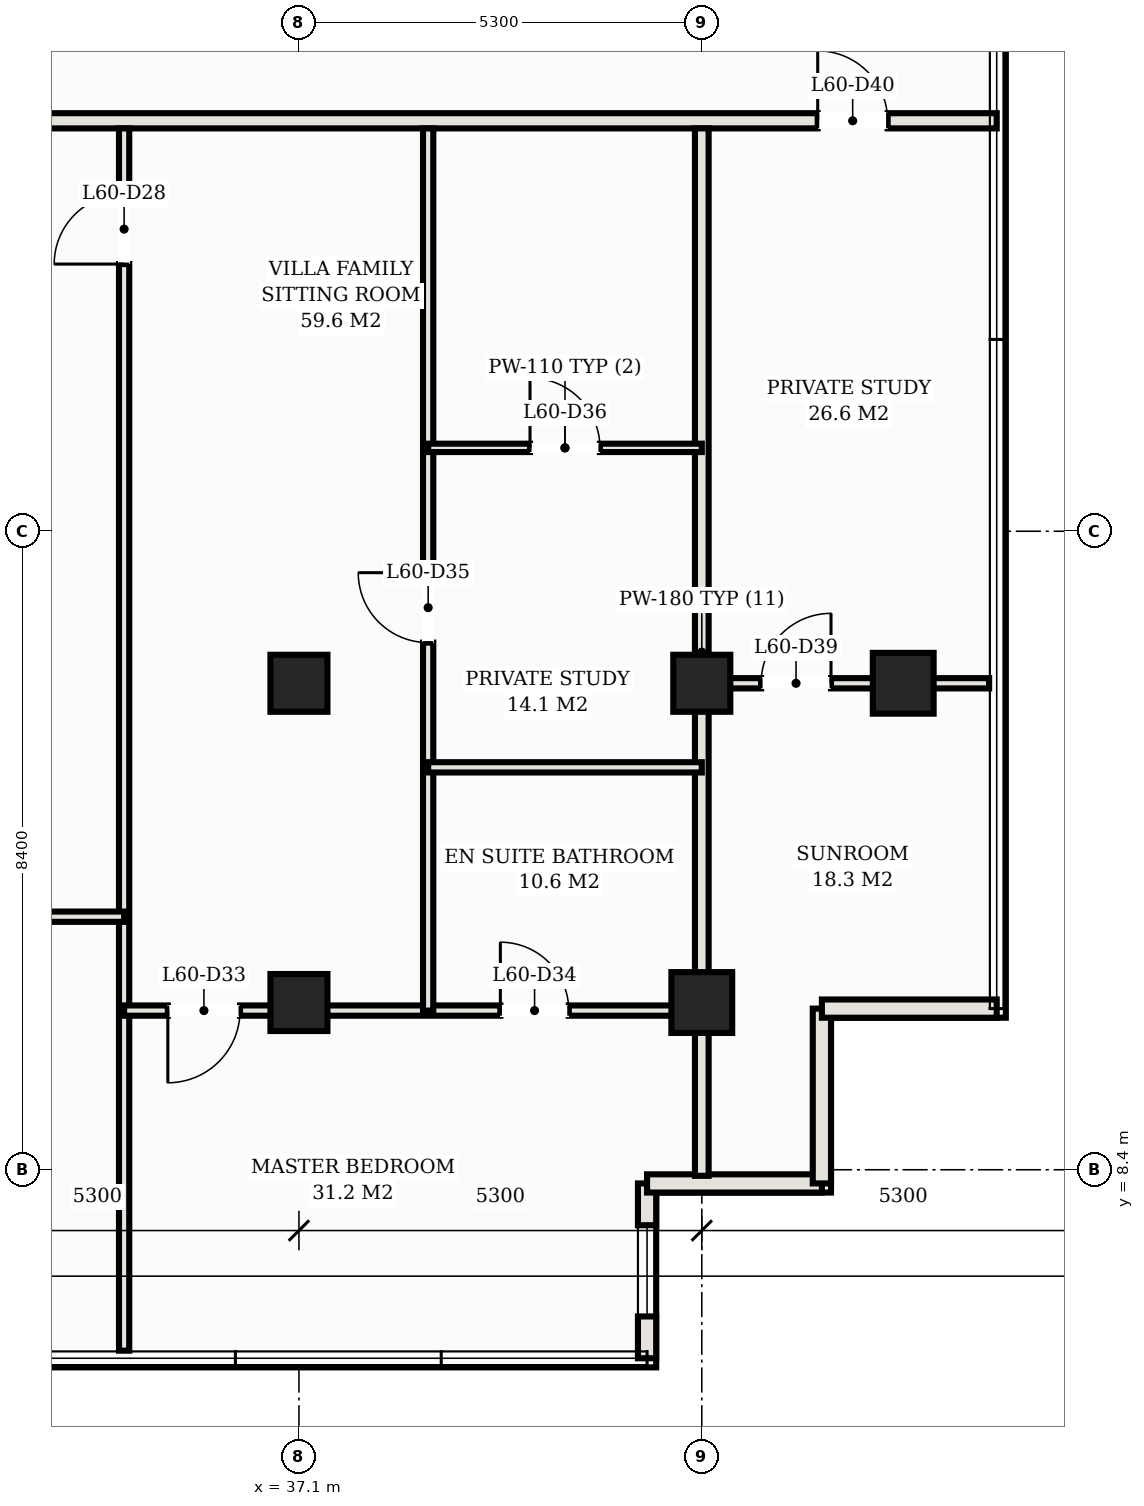
"""IFC4 building model, lengths in metres.
Left out: names, types, materials, properties, quantities, classifications, styles, units other than length and angle.
Written with IfcOpenShell. Run it as: python <this file> out.ifc"""

import sys

from ifc_helpers import new_model, si_unit, direction, frame, frame_2d, origin, origin_2d, place, context, subcontext, project, spatial, rectangle, hollow_rectangle, extrude, element, fill, save


model = new_model("IFC4")
c1 = context("Model", 3, precision=1e-05, world=origin(), true_north=direction((0.0, 1.0)))
c2 = subcontext(c1, "Body", "Model", "MODEL_VIEW")
j1 = project(units=[si_unit("LENGTHUNIT", "METRE"), si_unit("PLANEANGLEUNIT", "RADIAN")], contexts=[c1])
p1 = place(None, origin())
s1 = spatial("IfcSite", under=j1, at=p1, CompositionType="ELEMENT")
p2 = place(p1, origin())
s2 = spatial("IfcBuilding", under=s1, at=p2, CompositionType="ELEMENT")
p3 = place(p2, frame((0.0, 0.0, 219.8)))
s3 = spatial("IfcBuildingStorey", under=s2, at=p3, CompositionType="ELEMENT", Elevation=219.8)
for number, where, z_axis, x_axis in (
    (1, (37.1, 14.8, 0.0), (0.0, 0.0, 1.0), (1.0, 0.0, 0.0)),
    (2, (37.1, 10.6, 0.0), (0.0, 0.0, 1.0), (1.0, 0.0, 0.0)),
    (3, (42.4, 14.8, 0.0), (0.0, 0.0, 1.0), (1.0, 0.0, 0.0)),
):
    element("IfcColumn", number, at=place(p3, frame(where, z_axis=z_axis, x_axis=x_axis)), inside=s3, PredefinedType="COLUMN", context=c2, shape_type="SweptSolid", body=[
        extrude(hollow_rectangle(XDim=0.75, YDim=0.75, WallThickness=0.025, at=origin_2d()), origin(), (0.0, 0.0, 1.0), 3.3),
    ])
for number, where, z_axis, x_axis in (
    (4, (42.4, 10.6, 0.0), (0.0, 0.0, 1.0), (1.0, 0.0, 0.0)),
    (5, (45.05, 14.8, 0.0), (0.0, 0.0, 1.0), (1.0, 0.0, 0.0)),
):
    element("IfcColumn", number, at=place(p3, frame(where, z_axis=z_axis, x_axis=x_axis)), inside=s3, PredefinedType="COLUMN", context=c2, shape_type="SweptSolid", body=[
        extrude(hollow_rectangle(XDim=0.8, YDim=0.8, WallThickness=0.028, at=origin_2d()), origin(), (0.0, 0.0, 1.0), 3.3),
    ])
p4 = place(p3, frame((41.68, 5.92, 0.0), z_axis=(0.0, 0.0, 1.0), x_axis=(0.0, 1.0, 0.0)))
e6 = element("IfcWall", 6, at=p4, inside=s3, PredefinedType="SOLIDWALL", context=c2, shape_type="SweptSolid", body=[
    extrude(rectangle(XDim=2.3, YDim=0.24, at=frame_2d((1.15, 0.0))), origin(), (0.0, 0.0, 1.0), 3.11),
])
p5 = place(p4, frame((0.55, 0.0, 0.75)))
e7 = element("IfcOpeningElement", 7, at=p5, cuts=e6, PredefinedType="OPENING", context=c2, shape_type="SweptSolid", body=[
    extrude(rectangle(XDim=1.2, YDim=1.5, at=frame_2d((0.6, 0.75))), frame((0.0, 0.13, 0.0), z_axis=(0.0, -1.0, 0.0), x_axis=(1.0, 0.0, 0.0)), (0.0, 0.0, 1.0), 0.26),
])
for number, where, z_axis, x_axis in (
    (8, (41.68, 8.22, 0.0), (0.0, 0.0, 1.0), (1.0, 0.0, 0.0)),
    (9, (43.98, 8.22, 0.0), (0.0, 0.0, 1.0), (0.0, 1.0, 0.0)),
    (10, (43.98, 10.52, 0.0), (0.0, 0.0, 1.0), (1.0, 0.0, 0.0)),
):
    element("IfcWall", number, at=place(p3, frame(where, z_axis=z_axis, x_axis=x_axis)), inside=s3, PredefinedType="SOLIDWALL", context=c2, shape_type="SweptSolid", body=[
        extrude(rectangle(XDim=2.3, YDim=0.24, at=frame_2d((1.15, 0.0))), origin(), (0.0, 0.0, 1.0), 3.11),
    ])
p6 = place(p3, frame((6.72, 22.2, 0.0), z_axis=(0.0, 0.0, 1.0), x_axis=(1.0, 0.0, 0.0)))
e11 = element("IfcWall", 11, at=p6, inside=s3, PredefinedType="PARTITIONING", context=c2, shape_type="SweptSolid", body=[
    extrude(rectangle(XDim=39.56, YDim=0.2, at=frame_2d((19.78, 0.0))), origin(), (0.0, 0.0, 1.0), 2.43),
])
p7 = place(p6, frame((4.63, 0.0, 0.0)))
e12 = element("IfcOpeningElement", 12, at=p7, cuts=e11, PredefinedType="OPENING", context=c2, shape_type="SweptSolid", body=[
    extrude(rectangle(XDim=1.1, YDim=2.25, at=frame_2d((0.55, 1.125))), frame((0.0, 0.11, 0.0), z_axis=(0.0, -1.0, 0.0), x_axis=(1.0, 0.0, 0.0)), (0.0, 0.0, 1.0), 0.22),
])
p8 = place(p6, frame((20.53, 0.0, 0.0)))
e13 = element("IfcOpeningElement", 13, at=p8, cuts=e11, PredefinedType="OPENING", context=c2, shape_type="SweptSolid", body=[
    extrude(rectangle(XDim=1.1, YDim=2.25, at=frame_2d((0.55, 1.125))), frame((0.0, 0.11, 0.0), z_axis=(0.0, -1.0, 0.0), x_axis=(1.0, 0.0, 0.0)), (0.0, 0.0, 1.0), 0.22),
])
p9 = place(p6, frame((1.435, 0.0, 0.0)))
e14 = element("IfcOpeningElement", 14, at=p9, cuts=e11, PredefinedType="OPENING", context=c2, shape_type="SweptSolid", body=[
    extrude(rectangle(XDim=0.92, YDim=2.15, at=frame_2d((0.46, 1.075))), frame((0.0, 0.11, 0.0), z_axis=(0.0, -1.0, 0.0), x_axis=(1.0, 0.0, 0.0)), (0.0, 0.0, 1.0), 0.22),
])
p10 = place(p6, frame((37.205, 0.0, 0.0)))
e15 = element("IfcOpeningElement", 15, at=p10, cuts=e11, PredefinedType="OPENING", context=c2, shape_type="SweptSolid", body=[
    extrude(rectangle(XDim=0.92, YDim=2.15, at=frame_2d((0.46, 1.075))), frame((0.0, 0.11, 0.0), z_axis=(0.0, -1.0, 0.0), x_axis=(1.0, 0.0, 0.0)), (0.0, 0.0, 1.0), 0.22),
])
p11 = place(p3, frame((42.4, 8.32, 0.0), z_axis=(0.0, 0.0, 1.0), x_axis=(0.0, 1.0, 0.0)))
e16 = element("IfcWall", 16, at=p11, inside=s3, PredefinedType="PARTITIONING", context=c2, shape_type="SweptSolid", body=[
    extrude(rectangle(XDim=13.78, YDim=0.18, at=frame_2d((6.89, 0.0))), origin(), (0.0, 0.0, 1.0), 2.43),
])
p12 = place(p3, frame((34.8, 6.02, 0.0), z_axis=(0.0, 0.0, 1.0), x_axis=(0.0, 1.0, 0.0)))
e17 = element("IfcWall", 17, at=p12, inside=s3, PredefinedType="PARTITIONING", context=c2, shape_type="SweptSolid", body=[
    extrude(rectangle(XDim=16.08, YDim=0.135, at=frame_2d((8.04, 0.0))), origin(), (0.0, 0.0, 1.0), 2.43),
])
p13 = place(p12, frame((14.295, 0.0, 0.0)))
e18 = element("IfcOpeningElement", 18, at=p13, cuts=e17, PredefinedType="OPENING", context=c2, shape_type="SweptSolid", body=[
    extrude(rectangle(XDim=0.92, YDim=2.15, at=frame_2d((0.46, 1.075))), frame((0.0, 0.078, 0.0), z_axis=(0.0, -1.0, 0.0), x_axis=(1.0, 0.0, 0.0)), (0.0, 0.0, 1.0), 0.155),
])
p14 = place(p3, frame((26.5, 11.729, 0.0), z_axis=(0.0, 0.0, 1.0), x_axis=(1.0, 0.0, 0.0)))
e19 = element("IfcWall", 19, at=p14, inside=s3, PredefinedType="PARTITIONING", context=c2, shape_type="SweptSolid", body=[
    extrude(rectangle(XDim=8.3, YDim=0.135, at=frame_2d((4.15, 0.0))), origin(), (0.0, 0.0, 1.0), 2.43),
])
p15 = place(p14, frame((0.815, 0.0, 0.0)))
e20 = element("IfcOpeningElement", 20, at=p15, cuts=e19, PredefinedType="OPENING", context=c2, shape_type="SweptSolid", body=[
    extrude(rectangle(XDim=0.92, YDim=2.15, at=frame_2d((0.46, 1.075))), frame((0.0, 0.078, 0.0), z_axis=(0.0, -1.0, 0.0), x_axis=(1.0, 0.0, 0.0)), (0.0, 0.0, 1.0), 0.155),
])
p16 = place(p3, frame((34.8, 10.494, 0.0), z_axis=(0.0, 0.0, 1.0), x_axis=(1.0, 0.0, 0.0)))
e21 = element("IfcWall", 21, at=p16, inside=s3, PredefinedType="PARTITIONING", context=c2, shape_type="SweptSolid", body=[
    extrude(rectangle(XDim=7.6, YDim=0.135, at=frame_2d((3.8, 0.0))), origin(), (0.0, 0.0, 1.0), 2.43),
])
p17 = place(p16, frame((0.575, 0.0, 0.0)))
e22 = element("IfcOpeningElement", 22, at=p17, cuts=e21, PredefinedType="OPENING", context=c2, shape_type="SweptSolid", body=[
    extrude(rectangle(XDim=0.95, YDim=2.15, at=frame_2d((0.475, 1.075))), frame((0.0, 0.078, 0.0), z_axis=(0.0, -1.0, 0.0), x_axis=(1.0, 0.0, 0.0)), (0.0, 0.0, 1.0), 0.155),
])
p18 = place(p16, frame((4.95, 0.0, 0.0)))
e23 = element("IfcOpeningElement", 23, at=p18, cuts=e21, PredefinedType="OPENING", context=c2, shape_type="SweptSolid", body=[
    extrude(rectangle(XDim=0.9, YDim=2.15, at=frame_2d((0.45, 1.075))), frame((0.0, 0.078, 0.0), z_axis=(0.0, -1.0, 0.0), x_axis=(1.0, 0.0, 0.0)), (0.0, 0.0, 1.0), 0.155),
])
p19 = place(p3, frame((38.8, 10.494, 0.0), z_axis=(0.0, 0.0, 1.0), x_axis=(0.0, 1.0, 0.0)))
e24 = element("IfcWall", 24, at=p19, inside=s3, PredefinedType="PARTITIONING", context=c2, shape_type="SweptSolid", body=[
    extrude(rectangle(XDim=11.606, YDim=0.135, at=frame_2d((5.803, 0.0))), origin(), (0.0, 0.0, 1.0), 2.43),
])
p20 = place(p19, frame((4.841, 0.0, 0.0)))
e25 = element("IfcOpeningElement", 25, at=p20, cuts=e24, PredefinedType="OPENING", context=c2, shape_type="SweptSolid", body=[
    extrude(rectangle(XDim=0.92, YDim=2.15, at=frame_2d((0.46, 1.075))), frame((0.0, 0.078, 0.0), z_axis=(0.0, -1.0, 0.0), x_axis=(1.0, 0.0, 0.0)), (0.0, 0.0, 1.0), 0.155),
])
p21 = place(p3, frame((38.8, 13.694, 0.0), z_axis=(0.0, 0.0, 1.0), x_axis=(1.0, 0.0, 0.0)))
e26 = element("IfcWall", 26, at=p21, inside=s3, PredefinedType="PARTITIONING", context=c2, shape_type="SweptSolid", body=[
    extrude(rectangle(XDim=3.6, YDim=0.135, at=frame_2d((1.8, 0.0))), origin(), (0.0, 0.0, 1.0), 2.43),
])
p22 = place(p3, frame((38.8, 17.897, 0.0), z_axis=(0.0, 0.0, 1.0), x_axis=(1.0, 0.0, 0.0)))
e27 = element("IfcWall", 27, at=p22, inside=s3, PredefinedType="MOVABLE", context=c2, shape_type="SweptSolid", body=[
    extrude(rectangle(XDim=3.6, YDim=0.11, at=frame_2d((1.8, 0.0))), origin(), (0.0, 0.0, 1.0), 2.43),
])
p23 = place(p22, frame((1.34, 0.0, 0.0)))
e28 = element("IfcOpeningElement", 28, at=p23, cuts=e27, PredefinedType="OPENING", context=c2, shape_type="SweptSolid", body=[
    extrude(rectangle(XDim=0.92, YDim=2.15, at=frame_2d((0.46, 1.075))), frame((0.0, 0.065, 0.0), z_axis=(0.0, -1.0, 0.0), x_axis=(1.0, 0.0, 0.0)), (0.0, 0.0, 1.0), 0.13),
])
p24 = place(p3, frame((42.4, 14.8, 0.0), z_axis=(0.0, 0.0, 1.0), x_axis=(1.0, 0.0, 0.0)))
e29 = element("IfcWall", 29, at=p24, inside=s3, PredefinedType="PARTITIONING", context=c2, shape_type="SweptSolid", body=[
    extrude(rectangle(XDim=3.78, YDim=0.135, at=frame_2d((1.89, 0.0))), origin(), (0.0, 0.0, 1.0), 2.43),
])
p25 = place(p24, frame((0.78, 0.0, 0.0)))
e30 = element("IfcOpeningElement", 30, at=p25, cuts=e29, PredefinedType="OPENING", context=c2, shape_type="SweptSolid", body=[
    extrude(rectangle(XDim=0.92, YDim=2.15, at=frame_2d((0.46, 1.075))), frame((0.0, 0.078, 0.0), z_axis=(0.0, -1.0, 0.0), x_axis=(1.0, 0.0, 0.0)), (0.0, 0.0, 1.0), 0.155),
])
p26 = place(p5, origin())
e31 = element("IfcWindow", 31, at=p26, inside=s3, PartitioningType="SINGLE_PANEL", PredefinedType="WINDOW", context=c2, shape_type="SweptSolid", body=[
    extrude(rectangle(XDim=1.2, YDim=1.5, at=frame_2d((0.6, 0.75))), frame((0.0, 0.03, 0.0), z_axis=(0.0, -1.0, 0.0), x_axis=(1.0, 0.0, 0.0)), (0.0, 0.0, 1.0), 0.06),
])
fill(e7, e31)
p27 = place(p13, origin())
e32 = element("IfcDoor", 32, at=p27, inside=s3, OperationType="SINGLE_SWING_LEFT", PredefinedType="DOOR", context=c2, shape_type="SweptSolid", body=[
    extrude(rectangle(XDim=0.92, YDim=2.15, at=frame_2d((0.46, 1.075))), frame((0.0, 0.025, 0.0), z_axis=(0.0, -1.0, 0.0), x_axis=(1.0, 0.0, 0.0)), (0.0, 0.0, 1.0), 0.05),
])
fill(e18, e32)
p28 = place(p17, frame((0.95, 0.0, 0.0), z_axis=(0.0, 0.0, 1.0), x_axis=(-1.0, 0.0, 0.0)))
e33 = element("IfcDoor", 33, at=p28, inside=s3, OperationType="SINGLE_SWING_RIGHT", PredefinedType="DOOR", context=c2, shape_type="SweptSolid", body=[
    extrude(rectangle(XDim=0.95, YDim=2.15, at=frame_2d((0.475, 1.075))), frame((0.0, 0.025, 0.0), z_axis=(0.0, -1.0, 0.0), x_axis=(1.0, 0.0, 0.0)), (0.0, 0.0, 1.0), 0.05),
])
fill(e22, e33)
p29 = place(p18, origin())
e34 = element("IfcDoor", 34, at=p29, inside=s3, OperationType="SINGLE_SWING_LEFT", PredefinedType="DOOR", context=c2, shape_type="SweptSolid", body=[
    extrude(rectangle(XDim=0.9, YDim=2.15, at=frame_2d((0.45, 1.075))), frame((0.0, 0.025, 0.0), z_axis=(0.0, -1.0, 0.0), x_axis=(1.0, 0.0, 0.0)), (0.0, 0.0, 1.0), 0.05),
])
fill(e23, e34)
p30 = place(p20, origin())
e35 = element("IfcDoor", 35, at=p30, inside=s3, OperationType="SINGLE_SWING_RIGHT", PredefinedType="DOOR", context=c2, shape_type="SweptSolid", body=[
    extrude(rectangle(XDim=0.92, YDim=2.15, at=frame_2d((0.46, 1.075))), frame((0.0, 0.025, 0.0), z_axis=(0.0, -1.0, 0.0), x_axis=(1.0, 0.0, 0.0)), (0.0, 0.0, 1.0), 0.05),
])
fill(e25, e35)
p31 = place(p23, origin())
e36 = element("IfcDoor", 36, at=p31, inside=s3, OperationType="SINGLE_SWING_LEFT", PredefinedType="DOOR", context=c2, shape_type="SweptSolid", body=[
    extrude(rectangle(XDim=0.92, YDim=2.15, at=frame_2d((0.46, 1.075))), frame((0.0, 0.025, 0.0), z_axis=(0.0, -1.0, 0.0), x_axis=(1.0, 0.0, 0.0)), (0.0, 0.0, 1.0), 0.05),
])
fill(e28, e36)
p32 = place(p25, origin())
e37 = element("IfcDoor", 37, at=p32, inside=s3, OperationType="SINGLE_SWING_RIGHT", PredefinedType="DOOR", context=c2, shape_type="SweptSolid", body=[
    extrude(rectangle(XDim=0.92, YDim=2.15, at=frame_2d((0.46, 1.075))), frame((0.0, 0.025, 0.0), z_axis=(0.0, -1.0, 0.0), x_axis=(1.0, 0.0, 0.0)), (0.0, 0.0, 1.0), 0.05),
])
fill(e30, e37)
p33 = place(p10, origin())
e38 = element("IfcDoor", 38, at=p33, inside=s3, OperationType="SINGLE_SWING_LEFT", PredefinedType="DOOR", context=c2, shape_type="SweptSolid", body=[
    extrude(rectangle(XDim=0.92, YDim=2.15, at=frame_2d((0.46, 1.075))), frame((0.0, 0.025, 0.0), z_axis=(0.0, -1.0, 0.0), x_axis=(1.0, 0.0, 0.0)), (0.0, 0.0, 1.0), 0.05),
])
fill(e15, e38)
save(model, sys.argv[1])
